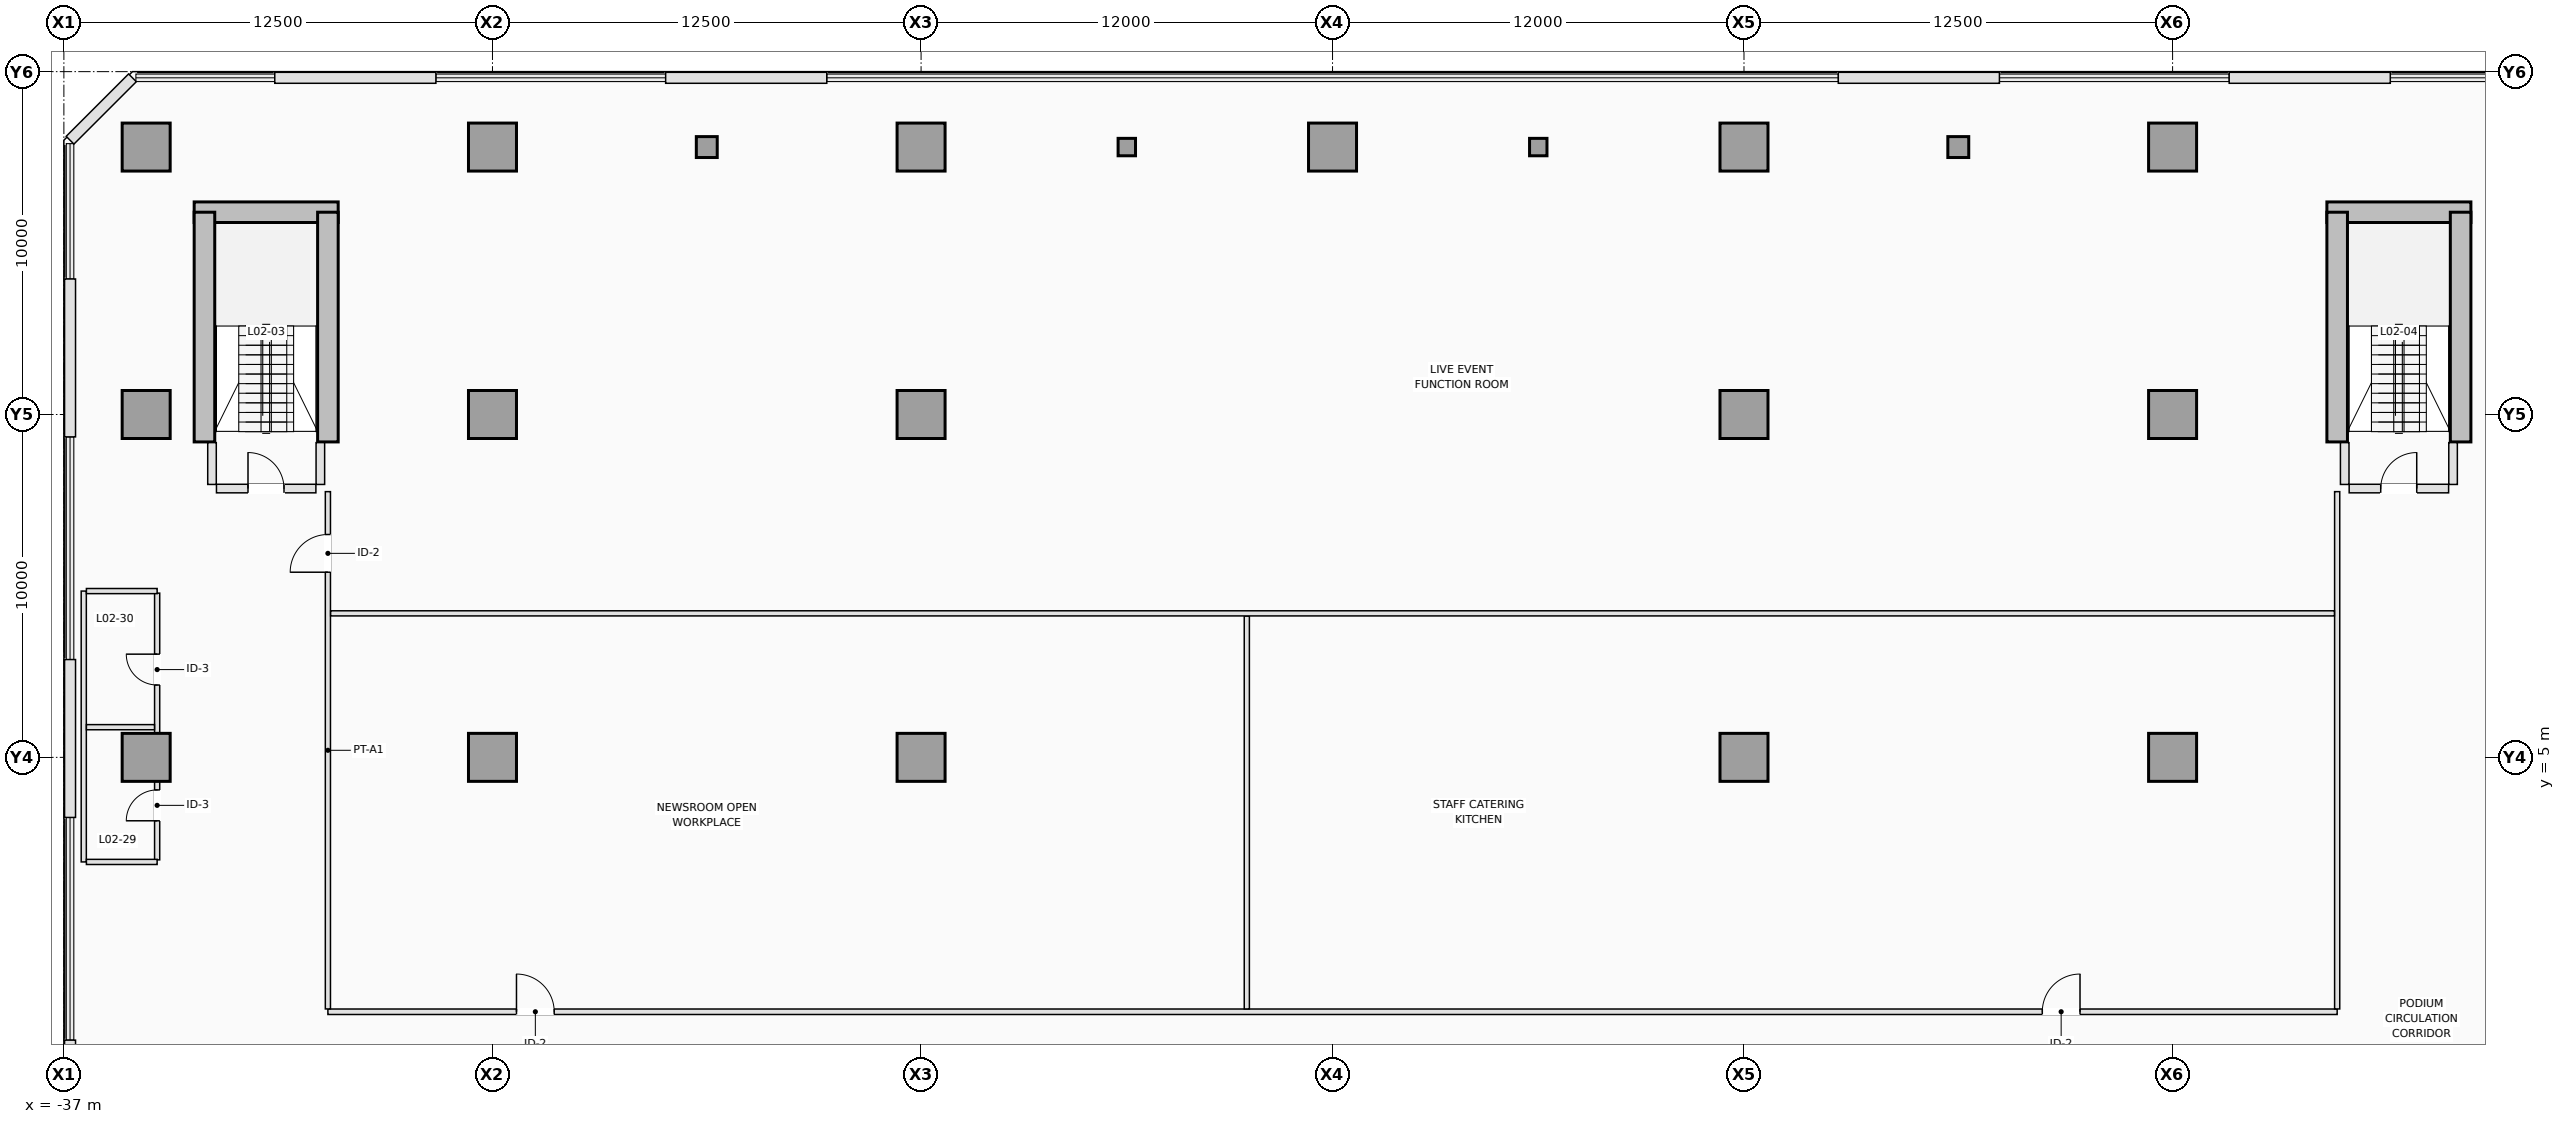
"""IFC4 building model, lengths in metres.
Left out: names, types, materials, properties, quantities, classifications, styles, units other than length and angle.
Written with IfcOpenShell. Run it as: python <this file> out.ifc"""

import sys

from ifc_helpers import new_model, si_unit, direction, frame, frame_2d, origin, origin_2d, place, context, subcontext, project, spatial, rectangle, hollow_circle, extrude, element, fill, save


model = new_model("IFC4")
c1 = context("Model", 3, precision=1e-05, world=origin(), true_north=direction((0.0, 1.0)))
c2 = subcontext(c1, "Body", "Model", "MODEL_VIEW")
j1 = project(units=[si_unit("LENGTHUNIT", "METRE"), si_unit("PLANEANGLEUNIT", "RADIAN")], contexts=[c1])
p1 = place(None, origin())
s1 = spatial("IfcSite", under=j1, at=p1, CompositionType="ELEMENT")
p2 = place(p1, origin())
s2 = spatial("IfcBuilding", under=s1, at=p2, CompositionType="ELEMENT")
p3 = place(p2, frame((0.0, 0.0, 9.5)))
s3 = spatial("IfcBuildingStorey", under=s2, at=p3, CompositionType="ELEMENT", Elevation=9.5)
p4 = place(p3, frame((-33.2, 20.9, 0.0), z_axis=(0.0, 0.0, 1.0), x_axis=(1.0, 0.0, 0.0)))
e1 = element("IfcWall", 1, at=p4, inside=s3, PredefinedType="SHEAR", context=c2, shape_type="SweptSolid", body=[
    extrude(rectangle(XDim=4.2, YDim=0.6, at=frame_2d((2.1, 0.0))), origin(), (0.0, 0.0, 1.0), 4.5),
])
for number, where, z_axis, x_axis in (
    (2, (-32.9, 14.2, 0.0), (0.0, 0.0, 1.0), (0.0, 1.0, 0.0)),
    (3, (-29.3, 14.2, 0.0), (0.0, 0.0, 1.0), (0.0, 1.0, 0.0)),
):
    element("IfcWall", number, at=place(p3, frame(where, z_axis=z_axis, x_axis=x_axis)), inside=s3, PredefinedType="SHEAR", context=c2, shape_type="SweptSolid", body=[
        extrude(rectangle(XDim=6.7, YDim=0.6, at=frame_2d((3.35, 0.0))), origin(), (0.0, 0.0, 1.0), 4.5),
    ])
p5 = place(p3, frame((29.0, 20.9, 0.0), z_axis=(0.0, 0.0, 1.0), x_axis=(1.0, 0.0, 0.0)))
e4 = element("IfcWall", 4, at=p5, inside=s3, PredefinedType="SHEAR", context=c2, shape_type="SweptSolid", body=[
    extrude(rectangle(XDim=4.2, YDim=0.6, at=frame_2d((2.1, 0.0))), origin(), (0.0, 0.0, 1.0), 4.5),
])
for number, where, z_axis, x_axis in (
    (5, (29.3, 14.2, 0.0), (0.0, 0.0, 1.0), (0.0, 1.0, 0.0)),
    (6, (32.9, 14.2, 0.0), (0.0, 0.0, 1.0), (0.0, 1.0, 0.0)),
):
    element("IfcWall", number, at=place(p3, frame(where, z_axis=z_axis, x_axis=x_axis)), inside=s3, PredefinedType="SHEAR", context=c2, shape_type="SweptSolid", body=[
        extrude(rectangle(XDim=6.7, YDim=0.6, at=frame_2d((3.35, 0.0))), origin(), (0.0, 0.0, 1.0), 4.5),
    ])
for number, where, z_axis, x_axis in (
    (7, (-34.6, 5.0, 0.0), (0.0, 0.0, 1.0), (1.0, 0.0, 0.0)),
    (8, (-24.5, 5.0, 0.0), (0.0, 0.0, 1.0), (1.0, 0.0, 0.0)),
    (9, (-12.0, 5.0, 0.0), (0.0, 0.0, 1.0), (1.0, 0.0, 0.0)),
    (10, (12.0, 5.0, 0.0), (0.0, 0.0, 1.0), (1.0, 0.0, 0.0)),
    (11, (24.5, 5.0, 0.0), (0.0, 0.0, 1.0), (1.0, 0.0, 0.0)),
    (12, (-34.6, 15.0, 0.0), (0.0, 0.0, 1.0), (1.0, 0.0, 0.0)),
    (13, (-24.5, 15.0, 0.0), (0.0, 0.0, 1.0), (1.0, 0.0, 0.0)),
    (14, (-12.0, 15.0, 0.0), (0.0, 0.0, 1.0), (1.0, 0.0, 0.0)),
    (15, (12.0, 15.0, 0.0), (0.0, 0.0, 1.0), (1.0, 0.0, 0.0)),
    (16, (24.5, 15.0, 0.0), (0.0, 0.0, 1.0), (1.0, 0.0, 0.0)),
    (17, (-34.6, 22.8, 0.0), (0.0, 0.0, 1.0), (1.0, 0.0, 0.0)),
    (18, (-24.5, 22.8, 0.0), (0.0, 0.0, 1.0), (1.0, 0.0, 0.0)),
    (19, (-12.0, 22.8, 0.0), (0.0, 0.0, 1.0), (1.0, 0.0, 0.0)),
    (20, (0.0, 22.8, 0.0), (0.0, 0.0, 1.0), (1.0, 0.0, 0.0)),
    (21, (12.0, 22.8, 0.0), (0.0, 0.0, 1.0), (1.0, 0.0, 0.0)),
    (22, (24.5, 22.8, 0.0), (0.0, 0.0, 1.0), (1.0, 0.0, 0.0)),
):
    element("IfcColumn", number, at=place(p3, frame(where, z_axis=z_axis, x_axis=x_axis)), inside=s3, PredefinedType="COLUMN", context=c2, shape_type="SweptSolid", body=[
        extrude(rectangle(XDim=1.4, YDim=1.4, at=origin_2d()), origin(), (0.0, 0.0, 1.0), 4.5),
    ])
for number, where, z_axis, x_axis in (
    (23, (-18.25, 22.8, 0.0), (0.0, 0.0, 1.0), (1.0, 0.0, 0.0)),
    (24, (18.25, 22.8, 0.0), (0.0, 0.0, 1.0), (1.0, 0.0, 0.0)),
):
    element("IfcColumn", number, at=place(p3, frame(where, z_axis=z_axis, x_axis=x_axis)), inside=s3, PredefinedType="COLUMN", context=c2, shape_type="SweptSolid", body=[
        extrude(hollow_circle(Radius=0.305, WallThickness=0.025, at=origin_2d()), origin(), (0.0, 0.0, 1.0), 4.5),
    ])
for number, where, z_axis, x_axis in (
    (25, (-6.0, 22.8, 0.0), (0.0, 0.0, 1.0), (1.0, 0.0, 0.0)),
    (26, (6.0, 22.8, 0.0), (0.0, 0.0, 1.0), (1.0, 0.0, 0.0)),
):
    element("IfcColumn", number, at=place(p3, frame(where, z_axis=z_axis, x_axis=x_axis)), inside=s3, PredefinedType="COLUMN", context=c2, shape_type="SweptSolid", body=[
        extrude(hollow_circle(Radius=0.254, WallThickness=0.022, at=origin_2d()), origin(), (0.0, 0.0, 1.0), 4.5),
    ])
p6 = place(p3, frame((-30.85, 24.82, 0.0), z_axis=(0.0, 0.0, 1.0), x_axis=(1.0, 0.0, 0.0)))
e27 = element("IfcWall", 27, at=p6, inside=s3, PredefinedType="STANDARD", context=c2, shape_type="SweptSolid", body=[
    extrude(rectangle(XDim=4.699, YDim=0.32, at=frame_2d((2.35, 0.0))), origin(), (0.0, 0.0, 1.0), 4.2),
])
for number, where, z_axis, x_axis in (
    (28, (-19.449, 24.82, 0.0), (0.0, 0.0, 1.0), (1.0, 0.0, 0.0)),
    (29, (14.75, 24.82, 0.0), (0.0, 0.0, 1.0), (1.0, 0.0, 0.0)),
):
    element("IfcWall", number, at=place(p3, frame(where, z_axis=z_axis, x_axis=x_axis)), inside=s3, PredefinedType="STANDARD", context=c2, shape_type="SweptSolid", body=[
        extrude(rectangle(XDim=4.699, YDim=0.32, at=frame_2d((2.35, 0.0))), origin(), (0.0, 0.0, 1.0), 4.2),
    ])
p7 = place(p3, frame((26.15, 24.82, 0.0), z_axis=(0.0, 0.0, 1.0), x_axis=(1.0, 0.0, 0.0)))
e30 = element("IfcWall", 30, at=p7, inside=s3, PredefinedType="STANDARD", context=c2, shape_type="SweptSolid", body=[
    extrude(rectangle(XDim=4.699, YDim=0.32, at=frame_2d((2.35, 0.0))), origin(), (0.0, 0.0, 1.0), 4.2),
])
for number, where, z_axis, x_axis in (
    (31, (-36.82, -7.853, 0.0), (0.0, 0.0, 1.0), (0.0, 1.0, 0.0)),
    (32, (-36.82, 3.247, 0.0), (0.0, 0.0, 1.0), (0.0, 1.0, 0.0)),
):
    element("IfcWall", number, at=place(p3, frame(where, z_axis=z_axis, x_axis=x_axis)), inside=s3, PredefinedType="STANDARD", context=c2, shape_type="SweptSolid", body=[
        extrude(rectangle(XDim=4.605, YDim=0.32, at=frame_2d((2.303, 0.0))), origin(), (0.0, 0.0, 1.0), 4.2),
    ])
p8 = place(p3, frame((-36.82, 14.347, 0.0), z_axis=(0.0, 0.0, 1.0), x_axis=(0.0, 1.0, 0.0)))
e33 = element("IfcWall", 33, at=p8, inside=s3, PredefinedType="STANDARD", context=c2, shape_type="SweptSolid", body=[
    extrude(rectangle(XDim=4.605, YDim=0.32, at=frame_2d((2.303, 0.0))), origin(), (0.0, 0.0, 1.0), 4.2),
])
p9 = place(p3, frame((-36.82, 23.0, 0.0), z_axis=(0.0, 0.0, 1.0), x_axis=(0.707106781187, 0.707106781187, 0.0)))
e34 = element("IfcWall", 34, at=p9, inside=s3, PredefinedType="STANDARD", context=c2, shape_type="SweptSolid", body=[
    extrude(rectangle(XDim=2.574, YDim=0.32, at=frame_2d((1.287, 0.0))), origin(), (0.0, 0.0, 1.0), 4.2),
])
p10 = place(p3, frame((-32.55, 12.84, 0.0), z_axis=(0.0, 0.0, 1.0), x_axis=(1.0, 0.0, 0.0)))
e35 = element("IfcWall", 35, at=p10, inside=s3, PredefinedType="PARTITIONING", context=c2, shape_type="SweptSolid", body=[
    extrude(rectangle(XDim=2.9, YDim=0.25, at=frame_2d((1.45, 0.0))), origin(), (0.0, 0.0, 1.0), 4.2),
])
p11 = place(p10, frame((0.92, 0.0, 0.0)))
e36 = element("IfcOpeningElement", 36, at=p11, cuts=e35, PredefinedType="OPENING", context=c2, shape_type="SweptSolid", body=[
    extrude(rectangle(XDim=1.05, YDim=2.15, at=frame_2d((0.525, 1.075))), frame((0.0, 0.135, 0.0), z_axis=(0.0, -1.0, 0.0), x_axis=(1.0, 0.0, 0.0)), (0.0, 0.0, 1.0), 0.27),
])
p12 = place(p3, frame((29.65, 12.84, 0.0), z_axis=(0.0, 0.0, 1.0), x_axis=(1.0, 0.0, 0.0)))
e37 = element("IfcWall", 37, at=p12, inside=s3, PredefinedType="PARTITIONING", context=c2, shape_type="SweptSolid", body=[
    extrude(rectangle(XDim=2.9, YDim=0.25, at=frame_2d((1.45, 0.0))), origin(), (0.0, 0.0, 1.0), 4.2),
])
p13 = place(p12, frame((0.92, 0.0, 0.0)))
e38 = element("IfcOpeningElement", 38, at=p13, cuts=e37, PredefinedType="OPENING", context=c2, shape_type="SweptSolid", body=[
    extrude(rectangle(XDim=1.05, YDim=2.15, at=frame_2d((0.525, 1.075))), frame((0.0, 0.135, 0.0), z_axis=(0.0, -1.0, 0.0), x_axis=(1.0, 0.0, 0.0)), (0.0, 0.0, 1.0), 0.27),
])
for number, where, z_axis, x_axis in (
    (39, (-32.68, 12.96, 0.0), (0.0, 0.0, 1.0), (0.0, 1.0, 0.0)),
    (40, (-29.52, 12.96, 0.0), (0.0, 0.0, 1.0), (0.0, 1.0, 0.0)),
    (41, (29.52, 12.96, 0.0), (0.0, 0.0, 1.0), (0.0, 1.0, 0.0)),
    (42, (32.68, 12.96, 0.0), (0.0, 0.0, 1.0), (0.0, 1.0, 0.0)),
):
    element("IfcWall", number, at=place(p3, frame(where, z_axis=z_axis, x_axis=x_axis)), inside=s3, PredefinedType="PARTITIONING", context=c2, shape_type="SweptSolid", body=[
        extrude(rectangle(XDim=1.22, YDim=0.25, at=frame_2d((0.61, 0.0))), origin(), (0.0, 0.0, 1.0), 4.2),
    ])
p14 = place(p3, frame((-29.3, -2.42, 0.0), z_axis=(0.0, 0.0, 1.0), x_axis=(1.0, 0.0, 0.0)))
e43 = element("IfcWall", 43, at=p14, inside=s3, PredefinedType="PARTITIONING", context=c2, shape_type="SweptSolid", body=[
    extrude(rectangle(XDim=58.6, YDim=0.16, at=frame_2d((29.3, 0.0))), origin(), (0.0, 0.0, 1.0), 4.2),
])
p15 = place(p14, frame((5.5, 0.0, 0.0)))
e44 = element("IfcOpeningElement", 44, at=p15, cuts=e43, PredefinedType="OPENING", context=c2, shape_type="SweptSolid", body=[
    extrude(rectangle(XDim=1.1, YDim=2.15, at=frame_2d((0.55, 1.075))), frame((0.0, 0.09, 0.0), z_axis=(0.0, -1.0, 0.0), x_axis=(1.0, 0.0, 0.0)), (0.0, 0.0, 1.0), 0.18),
])
p16 = place(p14, frame((50.0, 0.0, 0.0)))
e45 = element("IfcOpeningElement", 45, at=p16, cuts=e43, PredefinedType="OPENING", context=c2, shape_type="SweptSolid", body=[
    extrude(rectangle(XDim=1.1, YDim=2.15, at=frame_2d((0.55, 1.075))), frame((0.0, 0.09, 0.0), z_axis=(0.0, -1.0, 0.0), x_axis=(1.0, 0.0, 0.0)), (0.0, 0.0, 1.0), 0.18),
])
p17 = place(p3, frame((-29.3, -2.338, 0.0), z_axis=(0.0, 0.0, 1.0), x_axis=(0.0, 1.0, 0.0)))
e46 = element("IfcWall", 46, at=p17, inside=s3, PredefinedType="PARTITIONING", context=c2, shape_type="SweptSolid", body=[
    extrude(rectangle(XDim=15.088, YDim=0.15, at=frame_2d((7.544, 0.0))), origin(), (0.0, 0.0, 1.0), 4.2),
])
p18 = place(p17, frame((12.738, 0.0, 0.0)))
e47 = element("IfcOpeningElement", 47, at=p18, cuts=e46, PredefinedType="OPENING", context=c2, shape_type="SweptSolid", body=[
    extrude(rectangle(XDim=1.1, YDim=2.15, at=frame_2d((0.55, 1.075))), frame((0.0, 0.085, 0.0), z_axis=(0.0, -1.0, 0.0), x_axis=(1.0, 0.0, 0.0)), (0.0, 0.0, 1.0), 0.17),
])
p19 = place(p3, frame((29.3, -2.338, 0.0), z_axis=(0.0, 0.0, 1.0), x_axis=(0.0, 1.0, 0.0)))
e48 = element("IfcWall", 48, at=p19, inside=s3, PredefinedType="PARTITIONING", context=c2, shape_type="SweptSolid", body=[
    extrude(rectangle(XDim=15.088, YDim=0.15, at=frame_2d((7.544, 0.0))), origin(), (0.0, 0.0, 1.0), 4.2),
])
p20 = place(p3, frame((-2.5, -2.338, 0.0), z_axis=(0.0, 0.0, 1.0), x_axis=(0.0, 1.0, 0.0)))
e49 = element("IfcWall", 49, at=p20, inside=s3, PredefinedType="PARTITIONING", context=c2, shape_type="SweptSolid", body=[
    extrude(rectangle(XDim=11.458, YDim=0.15, at=frame_2d((5.729, 0.0))), origin(), (0.0, 0.0, 1.0), 4.2),
])
p21 = place(p3, frame((-29.22, 9.2, 0.0), z_axis=(0.0, 0.0, 1.0), x_axis=(1.0, 0.0, 0.0)))
e50 = element("IfcWall", 50, at=p21, inside=s3, PredefinedType="PARTITIONING", context=c2, shape_type="SweptSolid", body=[
    extrude(rectangle(XDim=58.44, YDim=0.15, at=frame_2d((29.22, 0.0))), origin(), (0.0, 0.0, 1.0), 4.2),
])
p22 = place(p3, frame((-36.42, 1.95, 0.0), z_axis=(0.0, 0.0, 1.0), x_axis=(0.0, 1.0, 0.0)))
e51 = element("IfcWall", 51, at=p22, inside=s3, PredefinedType="PARTITIONING", context=c2, shape_type="SweptSolid", body=[
    extrude(rectangle(XDim=7.9, YDim=0.15, at=frame_2d((3.95, 0.0))), origin(), (0.0, 0.0, 1.0), 4.2),
])
p23 = place(p3, frame((-34.28, 2.01, 0.0), z_axis=(0.0, 0.0, 1.0), x_axis=(0.0, 1.0, 0.0)))
e52 = element("IfcWall", 52, at=p23, inside=s3, PredefinedType="PARTITIONING", context=c2, shape_type="SweptSolid", body=[
    extrude(rectangle(XDim=2.288, YDim=0.15, at=frame_2d((1.144, 0.0))), origin(), (0.0, 0.0, 1.0), 4.2),
])
p24 = place(p23, frame((1.14, 0.0, 0.0)))
e53 = element("IfcOpeningElement", 53, at=p24, cuts=e52, PredefinedType="OPENING", context=c2, shape_type="SweptSolid", body=[
    extrude(rectangle(XDim=0.9, YDim=2.12, at=frame_2d((0.45, 1.06))), frame((0.0, 0.085, 0.0), z_axis=(0.0, -1.0, 0.0), x_axis=(1.0, 0.0, 0.0)), (0.0, 0.0, 1.0), 0.17),
])
p25 = place(p3, frame((-34.28, 5.702, 0.0), z_axis=(0.0, 0.0, 1.0), x_axis=(0.0, 1.0, 0.0)))
e54 = element("IfcWall", 54, at=p25, inside=s3, PredefinedType="PARTITIONING", context=c2, shape_type="SweptSolid", body=[
    extrude(rectangle(XDim=4.088, YDim=0.15, at=frame_2d((2.044, 0.0))), origin(), (0.0, 0.0, 1.0), 4.2),
])
p26 = place(p25, frame((1.408, 0.0, 0.0)))
e55 = element("IfcOpeningElement", 55, at=p26, cuts=e54, PredefinedType="OPENING", context=c2, shape_type="SweptSolid", body=[
    extrude(rectangle(XDim=0.9, YDim=2.12, at=frame_2d((0.45, 1.06))), frame((0.0, 0.085, 0.0), z_axis=(0.0, -1.0, 0.0), x_axis=(1.0, 0.0, 0.0)), (0.0, 0.0, 1.0), 0.17),
])
p27 = place(p3, frame((-36.343, 5.88, 0.0), z_axis=(0.0, 0.0, 1.0), x_axis=(1.0, 0.0, 0.0)))
e56 = element("IfcWall", 56, at=p27, inside=s3, PredefinedType="PARTITIONING", context=c2, shape_type="SweptSolid", body=[
    extrude(rectangle(XDim=1.986, YDim=0.15, at=frame_2d((0.993, 0.0))), origin(), (0.0, 0.0, 1.0), 4.2),
])
for number, where, z_axis, x_axis in (
    (57, (-36.343, 1.95, 0.0), (0.0, 0.0, 1.0), (1.0, 0.0, 0.0)),
    (58, (-36.343, 9.85, 0.0), (0.0, 0.0, 1.0), (1.0, 0.0, 0.0)),
):
    element("IfcWall", number, at=place(p3, frame(where, z_axis=z_axis, x_axis=x_axis)), inside=s3, PredefinedType="PARTITIONING", context=c2, shape_type="SweptSolid", body=[
        extrude(rectangle(XDim=2.063, YDim=0.15, at=frame_2d((1.031, 0.0))), origin(), (0.0, 0.0, 1.0), 4.2),
    ])
p28 = place(p11, origin())
e59 = element("IfcDoor", 59, at=p28, inside=s3, OperationType="SINGLE_SWING_LEFT", PredefinedType="DOOR", context=c2, shape_type="SweptSolid", body=[
    extrude(rectangle(XDim=1.05, YDim=2.15, at=frame_2d((0.525, 1.075))), frame((0.0, 0.025, 0.0), z_axis=(0.0, -1.0, 0.0), x_axis=(1.0, 0.0, 0.0)), (0.0, 0.0, 1.0), 0.05),
])
fill(e36, e59)
p29 = place(p13, origin())
e60 = element("IfcDoor", 60, at=p29, inside=s3, OperationType="SINGLE_SWING_RIGHT", PredefinedType="DOOR", context=c2, shape_type="SweptSolid", body=[
    extrude(rectangle(XDim=1.05, YDim=2.15, at=frame_2d((0.525, 1.075))), frame((0.0, 0.025, 0.0), z_axis=(0.0, -1.0, 0.0), x_axis=(1.0, 0.0, 0.0)), (0.0, 0.0, 1.0), 0.05),
])
fill(e38, e60)
p30 = place(p15, origin())
e61 = element("IfcDoor", 61, at=p30, inside=s3, OperationType="SINGLE_SWING_LEFT", PredefinedType="DOOR", context=c2, shape_type="SweptSolid", body=[
    extrude(rectangle(XDim=1.1, YDim=2.15, at=frame_2d((0.55, 1.075))), frame((0.0, 0.025, 0.0), z_axis=(0.0, -1.0, 0.0), x_axis=(1.0, 0.0, 0.0)), (0.0, 0.0, 1.0), 0.05),
])
fill(e44, e61)
p31 = place(p16, origin())
e62 = element("IfcDoor", 62, at=p31, inside=s3, OperationType="SINGLE_SWING_RIGHT", PredefinedType="DOOR", context=c2, shape_type="SweptSolid", body=[
    extrude(rectangle(XDim=1.1, YDim=2.15, at=frame_2d((0.55, 1.075))), frame((0.0, 0.025, 0.0), z_axis=(0.0, -1.0, 0.0), x_axis=(1.0, 0.0, 0.0)), (0.0, 0.0, 1.0), 0.05),
])
fill(e45, e62)
p32 = place(p18, origin())
e63 = element("IfcDoor", 63, at=p32, inside=s3, OperationType="SINGLE_SWING_LEFT", PredefinedType="DOOR", context=c2, shape_type="SweptSolid", body=[
    extrude(rectangle(XDim=1.1, YDim=2.15, at=frame_2d((0.55, 1.075))), frame((0.0, 0.025, 0.0), z_axis=(0.0, -1.0, 0.0), x_axis=(1.0, 0.0, 0.0)), (0.0, 0.0, 1.0), 0.05),
])
fill(e47, e63)
p33 = place(p24, origin())
e64 = element("IfcDoor", 64, at=p33, inside=s3, OperationType="SINGLE_SWING_LEFT", PredefinedType="DOOR", context=c2, shape_type="SweptSolid", body=[
    extrude(rectangle(XDim=0.9, YDim=2.12, at=frame_2d((0.45, 1.06))), frame((0.0, 0.025, 0.0), z_axis=(0.0, -1.0, 0.0), x_axis=(1.0, 0.0, 0.0)), (0.0, 0.0, 1.0), 0.05),
])
fill(e53, e64)
p34 = place(p26, origin())
e65 = element("IfcDoor", 65, at=p34, inside=s3, OperationType="SINGLE_SWING_RIGHT", PredefinedType="DOOR", context=c2, shape_type="SweptSolid", body=[
    extrude(rectangle(XDim=0.9, YDim=2.12, at=frame_2d((0.45, 1.06))), frame((0.0, 0.025, 0.0), z_axis=(0.0, -1.0, 0.0), x_axis=(1.0, 0.0, 0.0)), (0.0, 0.0, 1.0), 0.05),
])
fill(e55, e65)
save(model, sys.argv[1])
